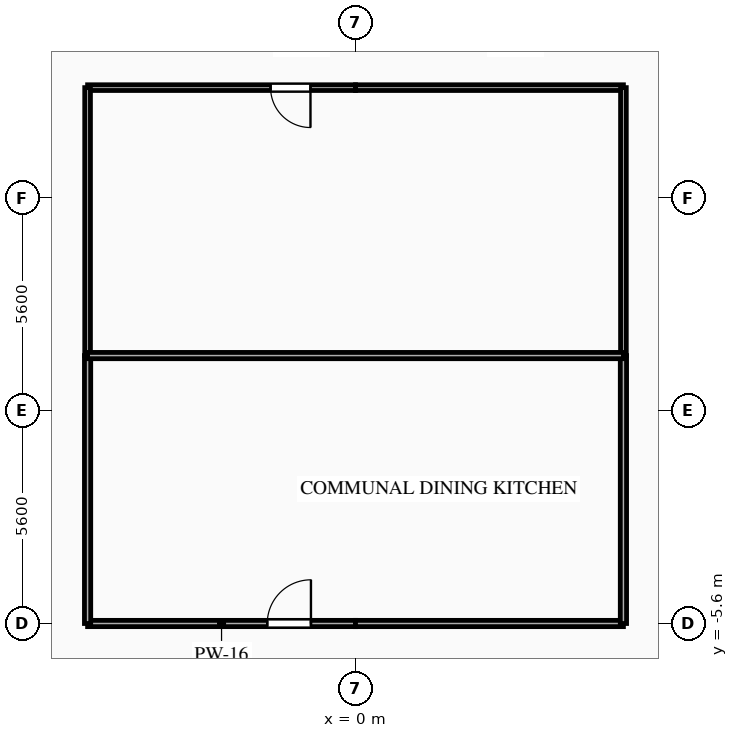
"""IFC4 building model, lengths in metres.
Left out: names, types, materials, properties, quantities, classifications, styles, units other than length and angle.
Written with IfcOpenShell. Run it as: python <this file> out.ifc"""

import sys

from ifc_helpers import new_model, si_unit, direction, frame, frame_2d, origin, place, context, subcontext, project, spatial, rectangle, extrude, element, fill, save


model = new_model("IFC4")
c1 = context("Model", 3, precision=1e-05, world=origin(), true_north=direction((0.0, 1.0)))
c2 = subcontext(c1, "Body", "Model", "MODEL_VIEW")
j1 = project(units=[si_unit("LENGTHUNIT", "METRE"), si_unit("PLANEANGLEUNIT", "RADIAN")], contexts=[c1])
p1 = place(None, origin())
s1 = spatial("IfcSite", under=j1, at=p1, CompositionType="ELEMENT")
p2 = place(p1, origin())
s2 = spatial("IfcBuilding", under=s1, at=p2, CompositionType="ELEMENT")
p3 = place(p2, frame((0.0, 0.0, 99.1)))
s3 = spatial("IfcBuildingStorey", under=s2, at=p3, CompositionType="ELEMENT", Elevation=99.1)
p4 = place(p3, frame((0.0, 8.5, 0.0), z_axis=(0.0, 0.0, 1.0), x_axis=(-1.0, 0.0, 0.0)))
e1 = element("IfcWall", 1, at=p4, inside=s3, PredefinedType="PARTITIONING", context=c2, shape_type="SweptSolid", body=[
    extrude(rectangle(XDim=7.05, YDim=0.15, at=frame_2d((3.525, 0.0))), origin(), (0.0, 0.0, 1.0), 3.045),
])
p5 = place(p4, frame((1.185, 0.0, 0.0)))
e2 = element("IfcOpeningElement", 2, at=p5, cuts=e1, PredefinedType="OPENING", context=c2, shape_type="SweptSolid", body=[
    extrude(rectangle(XDim=1.05, YDim=2.15, at=frame_2d((0.525, 1.075))), frame((0.0, 0.085, 0.0), z_axis=(0.0, -1.0, 0.0), x_axis=(1.0, 0.0, 0.0)), (0.0, 0.0, 1.0), 0.17),
])
p6 = place(p3, frame((7.05, 8.5, 0.0), z_axis=(0.0, 0.0, 1.0), x_axis=(-1.0, 0.0, 0.0)))
e3 = element("IfcWall", 3, at=p6, inside=s3, PredefinedType="PARTITIONING", context=c2, shape_type="SweptSolid", body=[
    extrude(rectangle(XDim=7.05, YDim=0.15, at=frame_2d((3.525, 0.0))), origin(), (0.0, 0.0, 1.0), 3.045),
])
p7 = place(p3, frame((-7.05, -5.6, 0.0), z_axis=(0.0, 0.0, 1.0), x_axis=(1.0, 0.0, 0.0)))
e4 = element("IfcWall", 4, at=p7, inside=s3, PredefinedType="PARTITIONING", context=c2, shape_type="SweptSolid", body=[
    extrude(rectangle(XDim=7.05, YDim=0.165, at=frame_2d((3.525, 0.0))), origin(), (0.0, 0.0, 1.0), 2.53),
])
p8 = place(p7, frame((4.728, 0.0, 0.0)))
e5 = element("IfcOpeningElement", 5, at=p8, cuts=e4, PredefinedType="OPENING", context=c2, shape_type="SweptSolid", body=[
    extrude(rectangle(XDim=1.15, YDim=2.15, at=frame_2d((0.575, 1.075))), frame((0.0, 0.093, 0.0), z_axis=(0.0, -1.0, 0.0), x_axis=(1.0, 0.0, 0.0)), (0.0, 0.0, 1.0), 0.185),
])
p9 = place(p3, frame((0.0, -5.6, 0.0), z_axis=(0.0, 0.0, 1.0), x_axis=(1.0, 0.0, 0.0)))
e6 = element("IfcWall", 6, at=p9, inside=s3, PredefinedType="PARTITIONING", context=c2, shape_type="SweptSolid", body=[
    extrude(rectangle(XDim=7.05, YDim=0.165, at=frame_2d((3.525, 0.0))), origin(), (0.0, 0.0, 1.0), 2.53),
])
p10 = place(p3, frame((-7.05, 1.45, 0.0), z_axis=(0.0, 0.0, 1.0), x_axis=(0.0, -1.0, 0.0)))
e7 = element("IfcWall", 7, at=p10, inside=s3, PredefinedType="PARTITIONING", context=c2, shape_type="SweptSolid", body=[
    extrude(rectangle(XDim=7.05, YDim=0.165, at=frame_2d((3.525, 0.0))), origin(), (0.0, 0.0, 1.0), 3.045),
])
p11 = place(p3, frame((-7.05, 8.5, 0.0), z_axis=(0.0, 0.0, 1.0), x_axis=(0.0, -1.0, 0.0)))
e8 = element("IfcWall", 8, at=p11, inside=s3, PredefinedType="PARTITIONING", context=c2, shape_type="SweptSolid", body=[
    extrude(rectangle(XDim=7.05, YDim=0.15, at=frame_2d((3.525, 0.0))), origin(), (0.0, 0.0, 1.0), 3.045),
])
p12 = place(p3, frame((7.05, -5.6, 0.0), z_axis=(0.0, 0.0, 1.0), x_axis=(0.0, 1.0, 0.0)))
e9 = element("IfcWall", 9, at=p12, inside=s3, PredefinedType="PARTITIONING", context=c2, shape_type="SweptSolid", body=[
    extrude(rectangle(XDim=7.05, YDim=0.165, at=frame_2d((3.525, 0.0))), origin(), (0.0, 0.0, 1.0), 3.045),
])
p13 = place(p3, frame((7.05, 1.45, 0.0), z_axis=(0.0, 0.0, 1.0), x_axis=(0.0, 1.0, 0.0)))
e10 = element("IfcWall", 10, at=p13, inside=s3, PredefinedType="PARTITIONING", context=c2, shape_type="SweptSolid", body=[
    extrude(rectangle(XDim=7.05, YDim=0.15, at=frame_2d((3.525, 0.0))), origin(), (0.0, 0.0, 1.0), 3.045),
])
p14 = place(p3, frame((-7.05, 1.45, 0.0), z_axis=(0.0, 0.0, 1.0), x_axis=(1.0, 0.0, 0.0)))
e11 = element("IfcWall", 11, at=p14, inside=s3, PredefinedType="PARTITIONING", context=c2, shape_type="SweptSolid", body=[
    extrude(rectangle(XDim=14.1, YDim=0.165, at=frame_2d((7.05, 0.0))), origin(), (0.0, 0.0, 1.0), 3.045),
])
p15 = place(p5, origin())
e12 = element("IfcDoor", 12, at=p15, inside=s3, OperationType="SINGLE_SWING_LEFT", PredefinedType="DOOR", context=c2, shape_type="SweptSolid", body=[
    extrude(rectangle(XDim=1.05, YDim=2.15, at=frame_2d((0.525, 1.075))), frame((0.0, 0.025, 0.0), z_axis=(0.0, -1.0, 0.0), x_axis=(1.0, 0.0, 0.0)), (0.0, 0.0, 1.0), 0.05),
])
fill(e2, e12)
p16 = place(p8, origin())
e13 = element("IfcDoor", 13, at=p16, inside=s3, OperationType="SINGLE_SWING_RIGHT", PredefinedType="DOOR", context=c2, shape_type="SweptSolid", body=[
    extrude(rectangle(XDim=1.15, YDim=2.15, at=frame_2d((0.575, 1.075))), frame((0.0, 0.025, 0.0), z_axis=(0.0, -1.0, 0.0), x_axis=(1.0, 0.0, 0.0)), (0.0, 0.0, 1.0), 0.05),
])
fill(e5, e13)
save(model, sys.argv[1])
